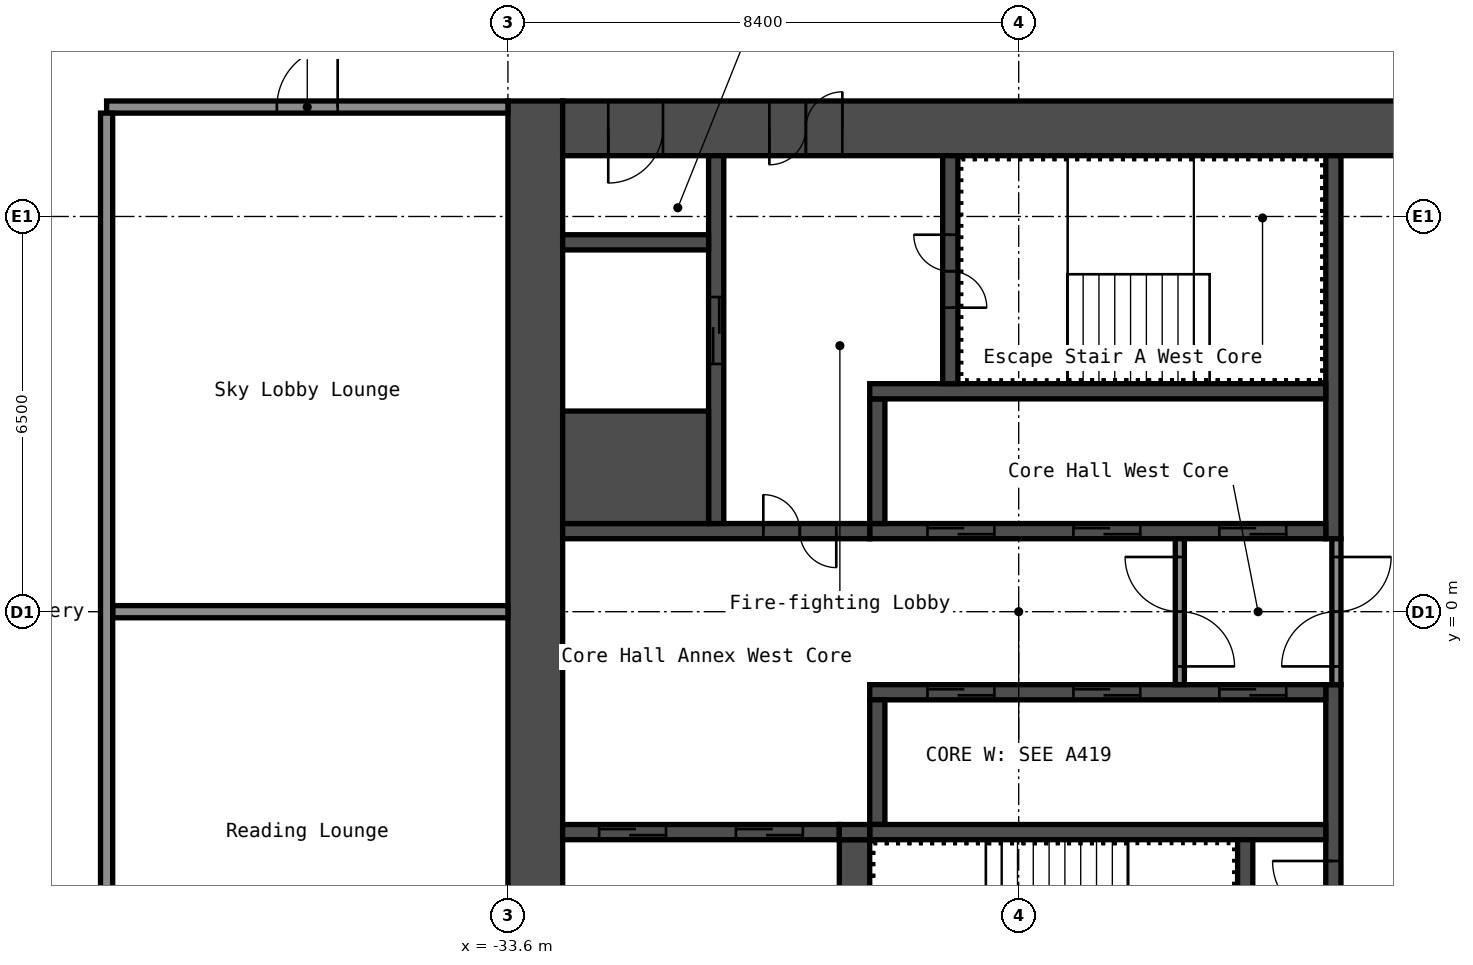
"""IFC4 building model, lengths in metres.
Left out: names, types, materials, properties, quantities, classifications, styles, units other than length and angle.
Written with IfcOpenShell. Run it as: python <this file> out.ifc"""

import sys

from ifc_helpers import new_model, si_unit, direction, frame, frame_2d, origin, place, context, subcontext, project, spatial, rectangle, extrude, element, fill, save


model = new_model("IFC4")
c1 = context("Model", 3, precision=1e-05, world=origin(), true_north=direction((0.0, 1.0)))
c2 = subcontext(c1, "Body", "Model", "MODEL_VIEW")
j1 = project(units=[si_unit("LENGTHUNIT", "METRE"), si_unit("PLANEANGLEUNIT", "RADIAN")], contexts=[c1])
p1 = place(None, origin())
s1 = spatial("IfcSite", under=j1, at=p1, CompositionType="ELEMENT")
p2 = place(p1, origin())
s2 = spatial("IfcBuilding", under=s1, at=p2, CompositionType="ELEMENT")
p3 = place(p2, frame((0.0, 0.0, 124.6)))
s3 = spatial("IfcBuildingStorey", under=s2, at=p3, CompositionType="ELEMENT", Elevation=124.6)
p4 = place(p3, frame((-33.15, -8.4, 0.0), z_axis=(0.0, 0.0, 1.0), x_axis=(0.0, 1.0, 0.0)))
e1 = element("IfcWall", 1, at=p4, inside=s3, PredefinedType="SHEAR", context=c2, shape_type="SweptSolid", body=[
    extrude(rectangle(XDim=16.8, YDim=0.9, at=frame_2d((8.4, 0.0))), origin(), (0.0, 0.0, 1.0), 5.95),
])
p5 = place(p3, frame((-32.7, 7.95, 0.0), z_axis=(0.0, 0.0, 1.0), x_axis=(1.0, 0.0, 0.0)))
e2 = element("IfcWall", 2, at=p5, inside=s3, PredefinedType="SHEAR", context=c2, shape_type="SweptSolid", body=[
    extrude(rectangle(XDim=15.0, YDim=0.9, at=frame_2d((7.5, 0.0))), origin(), (0.0, 0.0, 1.0), 5.95),
])
p6 = place(p5, frame((3.4, 0.0, 0.0)))
e3 = element("IfcOpeningElement", 3, at=p6, cuts=e2, PredefinedType="OPENING", context=c2, shape_type="SweptSolid", body=[
    extrude(rectangle(XDim=1.2, YDim=2.1, at=frame_2d((0.6, 1.05))), frame((0.0, 0.46, 0.0), z_axis=(0.0, -1.0, 0.0), x_axis=(1.0, 0.0, 0.0)), (0.0, 0.0, 1.0), 0.92),
])
p7 = place(p5, frame((0.75, 0.0, 0.0)))
e4 = element("IfcOpeningElement", 4, at=p7, cuts=e2, PredefinedType="OPENING", context=c2, shape_type="SweptSolid", body=[
    extrude(rectangle(XDim=0.9, YDim=2.1, at=frame_2d((0.45, 1.05))), frame((0.0, 0.46, 0.0), z_axis=(0.0, -1.0, 0.0), x_axis=(1.0, 0.0, 0.0)), (0.0, 0.0, 1.0), 0.92),
])
p8 = place(p3, frame((-20.025, 1.2, 0.0), z_axis=(0.0, 0.0, 1.0), x_axis=(0.0, 1.0, 0.0)))
e5 = element("IfcWall", 5, at=p8, inside=s3, PredefinedType="SHEAR", context=c2, shape_type="SweptSolid", body=[
    extrude(rectangle(XDim=6.3, YDim=0.25, at=frame_2d((3.15, 0.0))), origin(), (0.0, 0.0, 1.0), 5.95),
])
p9 = place(p3, frame((-20.025, -7.5, 0.0), z_axis=(0.0, 0.0, 1.0), x_axis=(0.0, 1.0, 0.0)))
e6 = element("IfcWall", 6, at=p9, inside=s3, PredefinedType="SHEAR", context=c2, shape_type="SweptSolid", body=[
    extrude(rectangle(XDim=6.3, YDim=0.25, at=frame_2d((3.15, 0.0))), origin(), (0.0, 0.0, 1.0), 5.95),
])
p10 = place(p9, frame((2.4, 0.0, 0.0)))
e7 = element("IfcOpeningElement", 7, at=p10, cuts=e6, PredefinedType="OPENING", context=c2, shape_type="SweptSolid", body=[
    extrude(rectangle(XDim=1.0, YDim=2.1, at=frame_2d((0.5, 1.05))), frame((0.0, 0.135, 0.0), z_axis=(0.0, -1.0, 0.0), x_axis=(1.0, 0.0, 0.0)), (0.0, 0.0, 1.0), 0.27),
])
p11 = place(p3, frame((-27.65, 1.325, 0.0), z_axis=(0.0, 0.0, 1.0), x_axis=(1.0, 0.0, 0.0)))
e8 = element("IfcWall", 8, at=p11, inside=s3, PredefinedType="SHEAR", context=c2, shape_type="SweptSolid", body=[
    extrude(rectangle(XDim=7.5, YDim=0.25, at=frame_2d((3.75, 0.0))), origin(), (0.0, 0.0, 1.0), 5.95),
])
p12 = place(p11, frame((5.75, 0.0, 0.0)))
e9 = element("IfcOpeningElement", 9, at=p12, cuts=e8, PredefinedType="OPENING", context=c2, shape_type="SweptSolid", body=[
    extrude(rectangle(XDim=1.1, YDim=2.1, at=frame_2d((0.55, 1.05))), frame((0.0, 0.135, 0.0), z_axis=(0.0, -1.0, 0.0), x_axis=(1.0, 0.0, 0.0)), (0.0, 0.0, 1.0), 0.27),
])
p13 = place(p11, frame((3.35, 0.0, 0.0)))
e10 = element("IfcOpeningElement", 10, at=p13, cuts=e8, PredefinedType="OPENING", context=c2, shape_type="SweptSolid", body=[
    extrude(rectangle(XDim=1.1, YDim=2.1, at=frame_2d((0.55, 1.05))), frame((0.0, 0.135, 0.0), z_axis=(0.0, -1.0, 0.0), x_axis=(1.0, 0.0, 0.0)), (0.0, 0.0, 1.0), 0.27),
])
p14 = place(p11, frame((0.95, 0.0, 0.0)))
e11 = element("IfcOpeningElement", 11, at=p14, cuts=e8, PredefinedType="OPENING", context=c2, shape_type="SweptSolid", body=[
    extrude(rectangle(XDim=1.1, YDim=2.1, at=frame_2d((0.55, 1.05))), frame((0.0, 0.135, 0.0), z_axis=(0.0, -1.0, 0.0), x_axis=(1.0, 0.0, 0.0)), (0.0, 0.0, 1.0), 0.27),
])
p15 = place(p3, frame((-27.525, 1.45, 0.0), z_axis=(0.0, 0.0, 1.0), x_axis=(0.0, 1.0, 0.0)))
e12 = element("IfcWall", 12, at=p15, inside=s3, PredefinedType="SHEAR", context=c2, shape_type="SweptSolid", body=[
    extrude(rectangle(XDim=2.05, YDim=0.25, at=frame_2d((1.025, 0.0))), origin(), (0.0, 0.0, 1.0), 5.95),
])
p16 = place(p3, frame((-27.65, 3.625, 0.0), z_axis=(0.0, 0.0, 1.0), x_axis=(1.0, 0.0, 0.0)))
e13 = element("IfcWall", 13, at=p16, inside=s3, PredefinedType="SHEAR", context=c2, shape_type="SweptSolid", body=[
    extrude(rectangle(XDim=7.5, YDim=0.25, at=frame_2d((3.75, 0.0))), origin(), (0.0, 0.0, 1.0), 5.95),
])
p17 = place(p3, frame((-26.325, 3.75, 0.0), z_axis=(0.0, 0.0, 1.0), x_axis=(0.0, 1.0, 0.0)))
e14 = element("IfcWall", 14, at=p17, inside=s3, PredefinedType="SHEAR", context=c2, shape_type="SweptSolid", body=[
    extrude(rectangle(XDim=3.75, YDim=0.25, at=frame_2d((1.875, 0.0))), origin(), (0.0, 0.0, 1.0), 5.95),
])
p18 = place(p17, frame((1.25, 0.0, 0.0)))
e15 = element("IfcOpeningElement", 15, at=p18, cuts=e14, PredefinedType="OPENING", context=c2, shape_type="SweptSolid", body=[
    extrude(rectangle(XDim=1.2, YDim=2.1, at=frame_2d((0.6, 1.05))), frame((0.0, 0.135, 0.0), z_axis=(0.0, -1.0, 0.0), x_axis=(1.0, 0.0, 0.0)), (0.0, 0.0, 1.0), 0.27),
])
p19 = place(p3, frame((-32.7, 1.325, 0.0), z_axis=(0.0, 0.0, 1.0), x_axis=(1.0, 0.0, 0.0)))
e16 = element("IfcWall", 16, at=p19, inside=s3, PredefinedType="SHEAR", context=c2, shape_type="SweptSolid", body=[
    extrude(rectangle(XDim=5.05, YDim=0.25, at=frame_2d((2.525, 0.0))), origin(), (0.0, 0.0, 1.0), 5.95),
])
p20 = place(p19, frame((3.3, 0.0, 0.0)))
e17 = element("IfcOpeningElement", 17, at=p20, cuts=e16, PredefinedType="OPENING", context=c2, shape_type="SweptSolid", body=[
    extrude(rectangle(XDim=1.2, YDim=2.1, at=frame_2d((0.6, 1.05))), frame((0.0, 0.135, 0.0), z_axis=(0.0, -1.0, 0.0), x_axis=(1.0, 0.0, 0.0)), (0.0, 0.0, 1.0), 0.27),
])
p21 = place(p3, frame((-30.175, 1.45, 0.0), z_axis=(0.0, 0.0, 1.0), x_axis=(0.0, 1.0, 0.0)))
e18 = element("IfcWall", 18, at=p21, inside=s3, PredefinedType="SHEAR", context=c2, shape_type="SweptSolid", body=[
    extrude(rectangle(XDim=6.05, YDim=0.25, at=frame_2d((3.025, 0.0))), origin(), (0.0, 0.0, 1.0), 5.95),
])
p22 = place(p21, frame((2.625, 0.0, 0.0)))
e19 = element("IfcOpeningElement", 19, at=p22, cuts=e18, PredefinedType="OPENING", context=c2, shape_type="SweptSolid", body=[
    extrude(rectangle(XDim=1.1, YDim=2.1, at=frame_2d((0.55, 1.05))), frame((0.0, 0.135, 0.0), z_axis=(0.0, -1.0, 0.0), x_axis=(1.0, 0.0, 0.0)), (0.0, 0.0, 1.0), 0.27),
])
p23 = place(p3, frame((-32.7, 2.375, 0.0), z_axis=(0.0, 0.0, 1.0), x_axis=(1.0, 0.0, 0.0)))
e20 = element("IfcWall", 20, at=p23, inside=s3, PredefinedType="SHEAR", context=c2, shape_type="SweptSolid", body=[
    extrude(rectangle(XDim=2.4, YDim=1.85, at=frame_2d((1.2, 0.0))), origin(), (0.0, 0.0, 1.0), 5.95),
])
p24 = place(p3, frame((-32.7, 6.075, 0.0), z_axis=(0.0, 0.0, 1.0), x_axis=(1.0, 0.0, 0.0)))
e21 = element("IfcWall", 21, at=p24, inside=s3, PredefinedType="SHEAR", context=c2, shape_type="SweptSolid", body=[
    extrude(rectangle(XDim=2.4, YDim=0.25, at=frame_2d((1.2, 0.0))), origin(), (0.0, 0.0, 1.0), 5.95),
])
p25 = place(p3, frame((-27.65, -1.325, 0.0), z_axis=(0.0, 0.0, 1.0), x_axis=(1.0, 0.0, 0.0)))
e22 = element("IfcWall", 22, at=p25, inside=s3, PredefinedType="SHEAR", context=c2, shape_type="SweptSolid", body=[
    extrude(rectangle(XDim=7.5, YDim=0.25, at=frame_2d((3.75, 0.0))), origin(), (0.0, 0.0, 1.0), 5.95),
])
p26 = place(p25, frame((5.75, 0.0, 0.0)))
e23 = element("IfcOpeningElement", 23, at=p26, cuts=e22, PredefinedType="OPENING", context=c2, shape_type="SweptSolid", body=[
    extrude(rectangle(XDim=1.1, YDim=2.1, at=frame_2d((0.55, 1.05))), frame((0.0, 0.135, 0.0), z_axis=(0.0, -1.0, 0.0), x_axis=(1.0, 0.0, 0.0)), (0.0, 0.0, 1.0), 0.27),
])
p27 = place(p25, frame((3.35, 0.0, 0.0)))
e24 = element("IfcOpeningElement", 24, at=p27, cuts=e22, PredefinedType="OPENING", context=c2, shape_type="SweptSolid", body=[
    extrude(rectangle(XDim=1.1, YDim=2.1, at=frame_2d((0.55, 1.05))), frame((0.0, 0.135, 0.0), z_axis=(0.0, -1.0, 0.0), x_axis=(1.0, 0.0, 0.0)), (0.0, 0.0, 1.0), 0.27),
])
p28 = place(p25, frame((0.95, 0.0, 0.0)))
e25 = element("IfcOpeningElement", 25, at=p28, cuts=e22, PredefinedType="OPENING", context=c2, shape_type="SweptSolid", body=[
    extrude(rectangle(XDim=1.1, YDim=2.1, at=frame_2d((0.55, 1.05))), frame((0.0, 0.135, 0.0), z_axis=(0.0, -1.0, 0.0), x_axis=(1.0, 0.0, 0.0)), (0.0, 0.0, 1.0), 0.27),
])
p29 = place(p3, frame((-27.525, -3.5, 0.0), z_axis=(0.0, 0.0, 1.0), x_axis=(0.0, 1.0, 0.0)))
e26 = element("IfcWall", 26, at=p29, inside=s3, PredefinedType="SHEAR", context=c2, shape_type="SweptSolid", body=[
    extrude(rectangle(XDim=2.05, YDim=0.25, at=frame_2d((1.025, 0.0))), origin(), (0.0, 0.0, 1.0), 5.95),
])
p30 = place(p3, frame((-27.65, -3.625, 0.0), z_axis=(0.0, 0.0, 1.0), x_axis=(1.0, 0.0, 0.0)))
e27 = element("IfcWall", 27, at=p30, inside=s3, PredefinedType="SHEAR", context=c2, shape_type="SweptSolid", body=[
    extrude(rectangle(XDim=7.5, YDim=0.25, at=frame_2d((3.75, 0.0))), origin(), (0.0, 0.0, 1.0), 5.95),
])
p31 = place(p3, frame((-21.475, -7.5, 0.0), z_axis=(0.0, 0.0, 1.0), x_axis=(0.0, 1.0, 0.0)))
e28 = element("IfcWall", 28, at=p31, inside=s3, PredefinedType="SHEAR", context=c2, shape_type="SweptSolid", body=[
    extrude(rectangle(XDim=3.75, YDim=0.25, at=frame_2d((1.875, 0.0))), origin(), (0.0, 0.0, 1.0), 5.95),
])
p32 = place(p31, frame((1.3, 0.0, 0.0)))
e29 = element("IfcOpeningElement", 29, at=p32, cuts=e28, PredefinedType="OPENING", context=c2, shape_type="SweptSolid", body=[
    extrude(rectangle(XDim=1.2, YDim=2.1, at=frame_2d((0.6, 1.05))), frame((0.0, 0.135, 0.0), z_axis=(0.0, -1.0, 0.0), x_axis=(1.0, 0.0, 0.0)), (0.0, 0.0, 1.0), 0.27),
])
p33 = place(p3, frame((-27.9, -7.5, 0.0), z_axis=(0.0, 0.0, 1.0), x_axis=(0.0, 1.0, 0.0)))
e30 = element("IfcWall", 30, at=p33, inside=s3, PredefinedType="SHEAR", context=c2, shape_type="SweptSolid", body=[
    extrude(rectangle(XDim=3.75, YDim=0.5, at=frame_2d((1.875, 0.0))), origin(), (0.0, 0.0, 1.0), 5.95),
])
p34 = place(p3, frame((-32.7, -3.625, 0.0), z_axis=(0.0, 0.0, 1.0), x_axis=(1.0, 0.0, 0.0)))
e31 = element("IfcWall", 31, at=p34, inside=s3, PredefinedType="SHEAR", context=c2, shape_type="SweptSolid", body=[
    extrude(rectangle(XDim=4.55, YDim=0.25, at=frame_2d((2.275, 0.0))), origin(), (0.0, 0.0, 1.0), 5.95),
])
p35 = place(p34, frame((2.85, 0.0, 0.0)))
e32 = element("IfcOpeningElement", 32, at=p35, cuts=e31, PredefinedType="OPENING", context=c2, shape_type="SweptSolid", body=[
    extrude(rectangle(XDim=1.1, YDim=2.1, at=frame_2d((0.55, 1.05))), frame((0.0, 0.135, 0.0), z_axis=(0.0, -1.0, 0.0), x_axis=(1.0, 0.0, 0.0)), (0.0, 0.0, 1.0), 0.27),
])
p36 = place(p34, frame((0.6, 0.0, 0.0)))
e33 = element("IfcOpeningElement", 33, at=p36, cuts=e31, PredefinedType="OPENING", context=c2, shape_type="SweptSolid", body=[
    extrude(rectangle(XDim=1.1, YDim=2.1, at=frame_2d((0.55, 1.05))), frame((0.0, 0.135, 0.0), z_axis=(0.0, -1.0, 0.0), x_axis=(1.0, 0.0, 0.0)), (0.0, 0.0, 1.0), 0.27),
])
p37 = place(p3, frame((-28.15, -3.625, 0.0), z_axis=(0.0, 0.0, 1.0), x_axis=(1.0, 0.0, 0.0)))
e34 = element("IfcWall", 34, at=p37, inside=s3, PredefinedType="SHEAR", context=c2, shape_type="SweptSolid", body=[
    extrude(rectangle(XDim=0.5, YDim=0.25, at=frame_2d((0.25, 0.0))), origin(), (0.0, 0.0, 1.0), 5.95),
])
p38 = place(p3, frame((-19.975, -1.2, 0.0), z_axis=(0.0, 0.0, 1.0), x_axis=(0.0, 1.0, 0.0)))
e35 = element("IfcWall", 35, at=p38, inside=s3, PredefinedType="PARTITIONING", context=c2, shape_type="SweptSolid", body=[
    extrude(rectangle(XDim=2.4, YDim=0.15, at=frame_2d((1.2, 0.0))), origin(), (0.0, 0.0, 1.0), 5.95),
])
p39 = place(p38, frame((0.3, 0.0, 0.0)))
e36 = element("IfcOpeningElement", 36, at=p39, cuts=e35, PredefinedType="OPENING", context=c2, shape_type="SweptSolid", body=[
    extrude(rectangle(XDim=1.8, YDim=2.1, at=frame_2d((0.9, 1.05))), frame((0.0, 0.085, 0.0), z_axis=(0.0, -1.0, 0.0), x_axis=(1.0, 0.0, 0.0)), (0.0, 0.0, 1.0), 0.17),
])
p40 = place(p3, frame((-22.55, -1.2, 0.0), z_axis=(0.0, 0.0, 1.0), x_axis=(0.0, 1.0, 0.0)))
e37 = element("IfcWall", 37, at=p40, inside=s3, PredefinedType="PARTITIONING", context=c2, shape_type="SweptSolid", body=[
    extrude(rectangle(XDim=2.4, YDim=0.15, at=frame_2d((1.2, 0.0))), origin(), (0.0, 0.0, 1.0), 5.95),
])
p41 = place(p40, frame((0.3, 0.0, 0.0)))
e38 = element("IfcOpeningElement", 38, at=p41, cuts=e37, PredefinedType="OPENING", context=c2, shape_type="SweptSolid", body=[
    extrude(rectangle(XDim=1.8, YDim=2.1, at=frame_2d((0.9, 1.05))), frame((0.0, 0.085, 0.0), z_axis=(0.0, -1.0, 0.0), x_axis=(1.0, 0.0, 0.0)), (0.0, 0.0, 1.0), 0.17),
])
p42 = place(p3, frame((-40.1, 0.0, 0.0), z_axis=(0.0, 0.0, 1.0), x_axis=(1.0, 0.0, 0.0)))
e39 = element("IfcWall", 39, at=p42, inside=s3, PredefinedType="PARTITIONING", context=c2, shape_type="SweptSolid", body=[
    extrude(rectangle(XDim=6.5, YDim=0.2, at=frame_2d((3.25, 0.0))), origin(), (0.0, 0.0, 1.0), 5.95),
])
p43 = place(p3, frame((-40.2, 8.3, 0.0), z_axis=(0.0, 0.0, 1.0), x_axis=(1.0, 0.0, 0.0)))
e40 = element("IfcWall", 40, at=p43, inside=s3, PredefinedType="PARTITIONING", context=c2, shape_type="SweptSolid", body=[
    extrude(rectangle(XDim=6.6, YDim=0.2, at=frame_2d((3.3, 0.0))), origin(), (0.0, 0.0, 1.0), 5.95),
])
p44 = place(p43, frame((2.8, 0.0, 0.0)))
e41 = element("IfcOpeningElement", 41, at=p44, cuts=e40, PredefinedType="OPENING", context=c2, shape_type="SweptSolid", body=[
    extrude(rectangle(XDim=1.0, YDim=2.1, at=frame_2d((0.5, 1.05))), frame((0.0, 0.11, 0.0), z_axis=(0.0, -1.0, 0.0), x_axis=(1.0, 0.0, 0.0)), (0.0, 0.0, 1.0), 0.22),
])
p45 = place(p3, frame((-40.2, -8.2, 0.0), z_axis=(0.0, 0.0, 1.0), x_axis=(0.0, 1.0, 0.0)))
e42 = element("IfcWall", 42, at=p45, inside=s3, PredefinedType="PARTITIONING", context=c2, shape_type="SweptSolid", body=[
    extrude(rectangle(XDim=16.4, YDim=0.2, at=frame_2d((8.2, 0.0))), origin(), (0.0, 0.0, 1.0), 5.95),
])
p46 = place(p6, origin())
e43 = element("IfcDoor", 43, at=p46, inside=s3, OperationType="DOUBLE_DOOR_SINGLE_SWING", PredefinedType="DOOR", context=c2, shape_type="SweptSolid", body=[
    extrude(rectangle(XDim=1.2, YDim=2.1, at=frame_2d((0.6, 1.05))), frame((0.0, 0.025, 0.0), z_axis=(0.0, -1.0, 0.0), x_axis=(1.0, 0.0, 0.0)), (0.0, 0.0, 1.0), 0.05),
])
fill(e3, e43)
p47 = place(p7, origin())
e44 = element("IfcDoor", 44, at=p47, inside=s3, OperationType="SINGLE_SWING_LEFT", PredefinedType="DOOR", context=c2, shape_type="SweptSolid", body=[
    extrude(rectangle(XDim=0.9, YDim=2.1, at=frame_2d((0.45, 1.05))), frame((0.0, 0.025, 0.0), z_axis=(0.0, -1.0, 0.0), x_axis=(1.0, 0.0, 0.0)), (0.0, 0.0, 1.0), 0.05),
])
fill(e4, e44)
p48 = place(p18, origin())
e45 = element("IfcDoor", 45, at=p48, inside=s3, OperationType="DOUBLE_DOOR_SINGLE_SWING", PredefinedType="DOOR", context=c2, shape_type="SweptSolid", body=[
    extrude(rectangle(XDim=1.2, YDim=2.1, at=frame_2d((0.6, 1.05))), frame((0.0, 0.025, 0.0), z_axis=(0.0, -1.0, 0.0), x_axis=(1.0, 0.0, 0.0)), (0.0, 0.0, 1.0), 0.05),
])
fill(e15, e45)
p49 = place(p10, origin())
e46 = element("IfcDoor", 46, at=p49, inside=s3, OperationType="SINGLE_SWING_LEFT", PredefinedType="DOOR", context=c2, shape_type="SweptSolid", body=[
    extrude(rectangle(XDim=1.0, YDim=2.1, at=frame_2d((0.5, 1.05))), frame((0.0, 0.025, 0.0), z_axis=(0.0, -1.0, 0.0), x_axis=(1.0, 0.0, 0.0)), (0.0, 0.0, 1.0), 0.05),
])
fill(e7, e46)
p50 = place(p20, origin())
e47 = element("IfcDoor", 47, at=p50, inside=s3, OperationType="DOUBLE_DOOR_SINGLE_SWING", PredefinedType="DOOR", context=c2, shape_type="SweptSolid", body=[
    extrude(rectangle(XDim=1.2, YDim=2.1, at=frame_2d((0.6, 1.05))), frame((0.0, 0.025, 0.0), z_axis=(0.0, -1.0, 0.0), x_axis=(1.0, 0.0, 0.0)), (0.0, 0.0, 1.0), 0.05),
])
fill(e17, e47)
p51 = place(p39, origin())
e48 = element("IfcDoor", 48, at=p51, inside=s3, OperationType="DOUBLE_DOOR_SINGLE_SWING", PredefinedType="DOOR", context=c2, shape_type="SweptSolid", body=[
    extrude(rectangle(XDim=1.8, YDim=2.1, at=frame_2d((0.9, 1.05))), frame((0.0, 0.025, 0.0), z_axis=(0.0, -1.0, 0.0), x_axis=(1.0, 0.0, 0.0)), (0.0, 0.0, 1.0), 0.05),
])
fill(e36, e48)
p52 = place(p41, origin())
e49 = element("IfcDoor", 49, at=p52, inside=s3, OperationType="DOUBLE_DOOR_SINGLE_SWING", PredefinedType="DOOR", context=c2, shape_type="SweptSolid", body=[
    extrude(rectangle(XDim=1.8, YDim=2.1, at=frame_2d((0.9, 1.05))), frame((0.0, 0.025, 0.0), z_axis=(0.0, -1.0, 0.0), x_axis=(1.0, 0.0, 0.0)), (0.0, 0.0, 1.0), 0.05),
])
fill(e38, e49)
p53 = place(p12, origin())
e50 = element("IfcDoor", 50, at=p53, inside=s3, OperationType="DOUBLE_DOOR_SLIDING", PredefinedType="DOOR", context=c2, shape_type="SweptSolid", body=[
    extrude(rectangle(XDim=1.1, YDim=2.1, at=frame_2d((0.55, 1.05))), frame((0.0, 0.025, 0.0), z_axis=(0.0, -1.0, 0.0), x_axis=(1.0, 0.0, 0.0)), (0.0, 0.0, 1.0), 0.05),
])
fill(e9, e50)
p54 = place(p13, origin())
e51 = element("IfcDoor", 51, at=p54, inside=s3, OperationType="DOUBLE_DOOR_SLIDING", PredefinedType="DOOR", context=c2, shape_type="SweptSolid", body=[
    extrude(rectangle(XDim=1.1, YDim=2.1, at=frame_2d((0.55, 1.05))), frame((0.0, 0.025, 0.0), z_axis=(0.0, -1.0, 0.0), x_axis=(1.0, 0.0, 0.0)), (0.0, 0.0, 1.0), 0.05),
])
fill(e10, e51)
p55 = place(p14, origin())
e52 = element("IfcDoor", 52, at=p55, inside=s3, OperationType="DOUBLE_DOOR_SLIDING", PredefinedType="DOOR", context=c2, shape_type="SweptSolid", body=[
    extrude(rectangle(XDim=1.1, YDim=2.1, at=frame_2d((0.55, 1.05))), frame((0.0, 0.025, 0.0), z_axis=(0.0, -1.0, 0.0), x_axis=(1.0, 0.0, 0.0)), (0.0, 0.0, 1.0), 0.05),
])
fill(e11, e52)
p56 = place(p26, origin())
e53 = element("IfcDoor", 53, at=p56, inside=s3, OperationType="DOUBLE_DOOR_SLIDING", PredefinedType="DOOR", context=c2, shape_type="SweptSolid", body=[
    extrude(rectangle(XDim=1.1, YDim=2.1, at=frame_2d((0.55, 1.05))), frame((0.0, 0.025, 0.0), z_axis=(0.0, -1.0, 0.0), x_axis=(1.0, 0.0, 0.0)), (0.0, 0.0, 1.0), 0.05),
])
fill(e23, e53)
p57 = place(p27, origin())
e54 = element("IfcDoor", 54, at=p57, inside=s3, OperationType="DOUBLE_DOOR_SLIDING", PredefinedType="DOOR", context=c2, shape_type="SweptSolid", body=[
    extrude(rectangle(XDim=1.1, YDim=2.1, at=frame_2d((0.55, 1.05))), frame((0.0, 0.025, 0.0), z_axis=(0.0, -1.0, 0.0), x_axis=(1.0, 0.0, 0.0)), (0.0, 0.0, 1.0), 0.05),
])
fill(e24, e54)
p58 = place(p28, origin())
e55 = element("IfcDoor", 55, at=p58, inside=s3, OperationType="DOUBLE_DOOR_SLIDING", PredefinedType="DOOR", context=c2, shape_type="SweptSolid", body=[
    extrude(rectangle(XDim=1.1, YDim=2.1, at=frame_2d((0.55, 1.05))), frame((0.0, 0.025, 0.0), z_axis=(0.0, -1.0, 0.0), x_axis=(1.0, 0.0, 0.0)), (0.0, 0.0, 1.0), 0.05),
])
fill(e25, e55)
p59 = place(p22, origin())
e56 = element("IfcDoor", 56, at=p59, inside=s3, OperationType="DOUBLE_DOOR_SLIDING", PredefinedType="DOOR", context=c2, shape_type="SweptSolid", body=[
    extrude(rectangle(XDim=1.1, YDim=2.1, at=frame_2d((0.55, 1.05))), frame((0.0, 0.025, 0.0), z_axis=(0.0, -1.0, 0.0), x_axis=(1.0, 0.0, 0.0)), (0.0, 0.0, 1.0), 0.05),
])
fill(e19, e56)
p60 = place(p35, origin())
e57 = element("IfcDoor", 57, at=p60, inside=s3, OperationType="DOUBLE_DOOR_SLIDING", PredefinedType="DOOR", context=c2, shape_type="SweptSolid", body=[
    extrude(rectangle(XDim=1.1, YDim=2.1, at=frame_2d((0.55, 1.05))), frame((0.0, 0.025, 0.0), z_axis=(0.0, -1.0, 0.0), x_axis=(1.0, 0.0, 0.0)), (0.0, 0.0, 1.0), 0.05),
])
fill(e32, e57)
p61 = place(p36, origin())
e58 = element("IfcDoor", 58, at=p61, inside=s3, OperationType="DOUBLE_DOOR_SLIDING", PredefinedType="DOOR", context=c2, shape_type="SweptSolid", body=[
    extrude(rectangle(XDim=1.1, YDim=2.1, at=frame_2d((0.55, 1.05))), frame((0.0, 0.025, 0.0), z_axis=(0.0, -1.0, 0.0), x_axis=(1.0, 0.0, 0.0)), (0.0, 0.0, 1.0), 0.05),
])
fill(e33, e58)
p62 = place(p44, origin())
e59 = element("IfcDoor", 59, at=p62, inside=s3, OperationType="SINGLE_SWING_LEFT", PredefinedType="DOOR", context=c2, shape_type="SweptSolid", body=[
    extrude(rectangle(XDim=1.0, YDim=2.1, at=frame_2d((0.5, 1.05))), frame((0.0, 0.025, 0.0), z_axis=(0.0, -1.0, 0.0), x_axis=(1.0, 0.0, 0.0)), (0.0, 0.0, 1.0), 0.05),
])
fill(e41, e59)
save(model, sys.argv[1])
